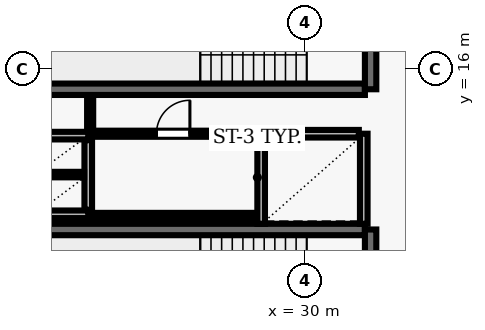
"""IFC4 building model, lengths in metres.
Left out: names, types, materials, properties, quantities, classifications, styles, units other than length and angle.
Written with IfcOpenShell. Run it as: python <this file> out.ifc"""

import sys

from ifc_helpers import new_model, si_unit, direction, frame, frame_2d, origin, place, context, subcontext, project, spatial, rectangle, extrude, element, fill, save


model = new_model("IFC4")
c1 = context("Model", 3, precision=1e-05, world=origin(), true_north=direction((0.0, 1.0)))
c2 = subcontext(c1, "Body", "Model", "MODEL_VIEW")
j1 = project(units=[si_unit("LENGTHUNIT", "METRE"), si_unit("PLANEANGLEUNIT", "RADIAN")], contexts=[c1])
p1 = place(None, origin())
s1 = spatial("IfcSite", under=j1, at=p1, CompositionType="ELEMENT")
p2 = place(p1, origin())
s2 = spatial("IfcBuilding", under=s1, at=p2, CompositionType="ELEMENT")
p3 = place(p2, frame((0.0, 0.0, 138.5)))
s3 = spatial("IfcBuildingStorey", under=s2, at=p3, CompositionType="ELEMENT", Elevation=138.5)
p4 = place(p3, frame((23.22, 15.47, 0.0), z_axis=(0.0, 0.0, 1.0), x_axis=(1.0, 0.0, 0.0)))
e1 = element("IfcWall", 1, at=p4, inside=s3, PredefinedType="SHEAR", context=c2, shape_type="SweptSolid", body=[
    extrude(rectangle(XDim=8.36, YDim=0.3, at=frame_2d((4.18, 0.0))), origin(), (0.0, 0.0, 1.0), 3.69),
])
p5 = place(p3, frame((31.73, 15.47, 0.0), z_axis=(0.0, 0.0, 1.0), x_axis=(0.0, 1.0, 0.0)))
e2 = element("IfcWall", 2, at=p5, inside=s3, PredefinedType="SHEAR", context=c2, shape_type="SweptSolid", body=[
    extrude(rectangle(XDim=3.51, YDim=0.3, at=frame_2d((1.755, 0.0))), origin(), (0.0, 0.0, 1.0), 3.69),
])
p6 = place(p5, frame((1.18, 0.0, 0.0)))
e3 = element("IfcOpeningElement", 3, at=p6, cuts=e2, PredefinedType="OPENING", context=c2, shape_type="SweptSolid", body=[
    extrude(rectangle(XDim=1.15, YDim=2.15, at=frame_2d((0.575, 1.075))), frame((0.0, 0.16, 0.0), z_axis=(0.0, -1.0, 0.0), x_axis=(1.0, 0.0, 0.0)), (0.0, 0.0, 1.0), 0.32),
])
p7 = place(p3, frame((31.58, 11.78, 0.0), z_axis=(0.0, 0.0, 1.0), x_axis=(-1.0, 0.0, 0.0)))
e4 = element("IfcWall", 4, at=p7, inside=s3, PredefinedType="SHEAR", context=c2, shape_type="SweptSolid", body=[
    extrude(rectangle(XDim=8.36, YDim=0.3, at=frame_2d((4.18, 0.0))), origin(), (0.0, 0.0, 1.0), 3.69),
])
p8 = place(p3, frame((31.73, 8.27, 0.0), z_axis=(0.0, 0.0, 1.0), x_axis=(0.0, 1.0, 0.0)))
e5 = element("IfcWall", 5, at=p8, inside=s3, PredefinedType="SHEAR", context=c2, shape_type="SweptSolid", body=[
    extrude(rectangle(XDim=3.51, YDim=0.3, at=frame_2d((1.755, 0.0))), origin(), (0.0, 0.0, 1.0), 3.69),
])
p9 = place(p8, frame((1.18, 0.0, 0.0)))
e6 = element("IfcOpeningElement", 6, at=p9, cuts=e5, PredefinedType="OPENING", context=c2, shape_type="SweptSolid", body=[
    extrude(rectangle(XDim=1.15, YDim=2.15, at=frame_2d((0.575, 1.075))), frame((0.0, 0.16, 0.0), z_axis=(0.0, -1.0, 0.0), x_axis=(1.0, 0.0, 0.0)), (0.0, 0.0, 1.0), 0.32),
])
for number, where, z_axis, x_axis in (
    (7, (28.85, 14.3, 0.0), (0.0, 0.0, 1.0), (0.0, -1.0, 0.0)),
    (8, (31.55, 11.93, 0.0), (0.0, 0.0, 1.0), (0.0, 1.0, 0.0)),
):
    element("IfcWall", number, at=place(p3, frame(where, z_axis=z_axis, x_axis=x_axis)), inside=s3, PredefinedType="SOLIDWALL", context=c2, shape_type="SweptSolid", body=[
        extrude(rectangle(XDim=2.37, YDim=0.2, at=frame_2d((1.185, 0.0))), origin(), (0.0, 0.0, 1.0), 3.69),
    ])
p10 = place(p3, frame((31.42, 14.3, 0.0), z_axis=(0.0, 0.0, 1.0), x_axis=(-1.0, 0.0, 0.0)))
e9 = element("IfcWall", 9, at=p10, inside=s3, PredefinedType="SOLIDWALL", context=c2, shape_type="SweptSolid", body=[
    extrude(rectangle(XDim=2.44, YDim=0.2, at=frame_2d((1.22, 0.0))), origin(), (0.0, 0.0, 1.0), 3.69),
])
for number, where, z_axis, x_axis in (
    (10, (22.9, 14.25, 0.0), (0.0, 0.0, 1.0), (1.0, 0.0, 0.0)),
    (11, (22.9, 12.18, 0.0), (0.0, 0.0, 1.0), (1.0, 0.0, 0.0)),
):
    element("IfcWall", number, at=place(p3, frame(where, z_axis=z_axis, x_axis=x_axis)), inside=s3, PredefinedType="SOLIDWALL", context=c2, shape_type="SweptSolid", body=[
        extrude(rectangle(XDim=1.4, YDim=0.2, at=frame_2d((0.7, 0.0))), origin(), (0.0, 0.0, 1.0), 3.69),
    ])
p11 = place(p3, frame((24.3, 12.3, 0.0), z_axis=(0.0, 0.0, 1.0), x_axis=(0.0, 1.0, 0.0)))
e12 = element("IfcWall", 12, at=p11, inside=s3, PredefinedType="SOLIDWALL", context=c2, shape_type="SweptSolid", body=[
    extrude(rectangle(XDim=1.83, YDim=0.2, at=frame_2d((0.915, 0.0))), origin(), (0.0, 0.0, 1.0), 3.69),
])
p12 = place(p3, frame((23.01, 13.225, 0.0), z_axis=(0.0, 0.0, 1.0), x_axis=(1.0, 0.0, 0.0)))
e13 = element("IfcWall", 13, at=p12, inside=s3, PredefinedType="PARTITIONING", context=c2, shape_type="SweptSolid", body=[
    extrude(rectangle(XDim=1.18, YDim=0.145, at=frame_2d((0.59, 0.0))), origin(), (0.0, 0.0, 1.0), 3.69),
])
p13 = place(p3, frame((24.35, 12.15, 0.0), z_axis=(0.0, 0.0, 1.0), x_axis=(1.0, 0.0, 0.0)))
e14 = element("IfcWall", 14, at=p13, inside=s3, PredefinedType="PARTITIONING", context=c2, shape_type="SweptSolid", body=[
    extrude(rectangle(XDim=4.37, YDim=0.135, at=frame_2d((2.185, 0.0))), origin(), (0.0, 0.0, 1.0), 3.69),
])
p14 = place(p3, frame((24.35, 14.3, 0.0), z_axis=(0.0, 0.0, 1.0), x_axis=(1.0, 0.0, 0.0)))
e15 = element("IfcWall", 15, at=p14, inside=s3, PredefinedType="PARTITIONING", context=c2, shape_type="SweptSolid", body=[
    extrude(rectangle(XDim=4.37, YDim=0.16, at=frame_2d((2.185, 0.0))), origin(), (0.0, 0.0, 1.0), 3.69),
])
p15 = place(p14, frame((1.745, 0.0, 0.0)))
e16 = element("IfcOpeningElement", 16, at=p15, cuts=e15, PredefinedType="OPENING", context=c2, shape_type="SweptSolid", body=[
    extrude(rectangle(XDim=0.88, YDim=2.1, at=frame_2d((0.44, 1.05))), frame((0.0, 0.09, 0.0), z_axis=(0.0, -1.0, 0.0), x_axis=(1.0, 0.0, 0.0)), (0.0, 0.0, 1.0), 0.18),
])
p16 = place(p3, frame((24.35, 15.29, 0.0), z_axis=(0.0, 0.0, 1.0), x_axis=(0.0, -1.0, 0.0)))
e17 = element("IfcWall", 17, at=p16, inside=s3, PredefinedType="PARTITIONING", context=c2, shape_type="SweptSolid", body=[
    extrude(rectangle(XDim=0.915, YDim=0.16, at=frame_2d((0.458, 0.0))), origin(), (0.0, 0.0, 1.0), 3.69),
])
p17 = place(p15, origin())
e18 = element("IfcDoor", 18, at=p17, inside=s3, OperationType="SINGLE_SWING_RIGHT", PredefinedType="DOOR", context=c2, shape_type="SweptSolid", body=[
    extrude(rectangle(XDim=0.88, YDim=2.1, at=frame_2d((0.44, 1.05))), frame((0.0, 0.025, 0.0), z_axis=(0.0, -1.0, 0.0), x_axis=(1.0, 0.0, 0.0)), (0.0, 0.0, 1.0), 0.05),
])
fill(e16, e18)
save(model, sys.argv[1])
